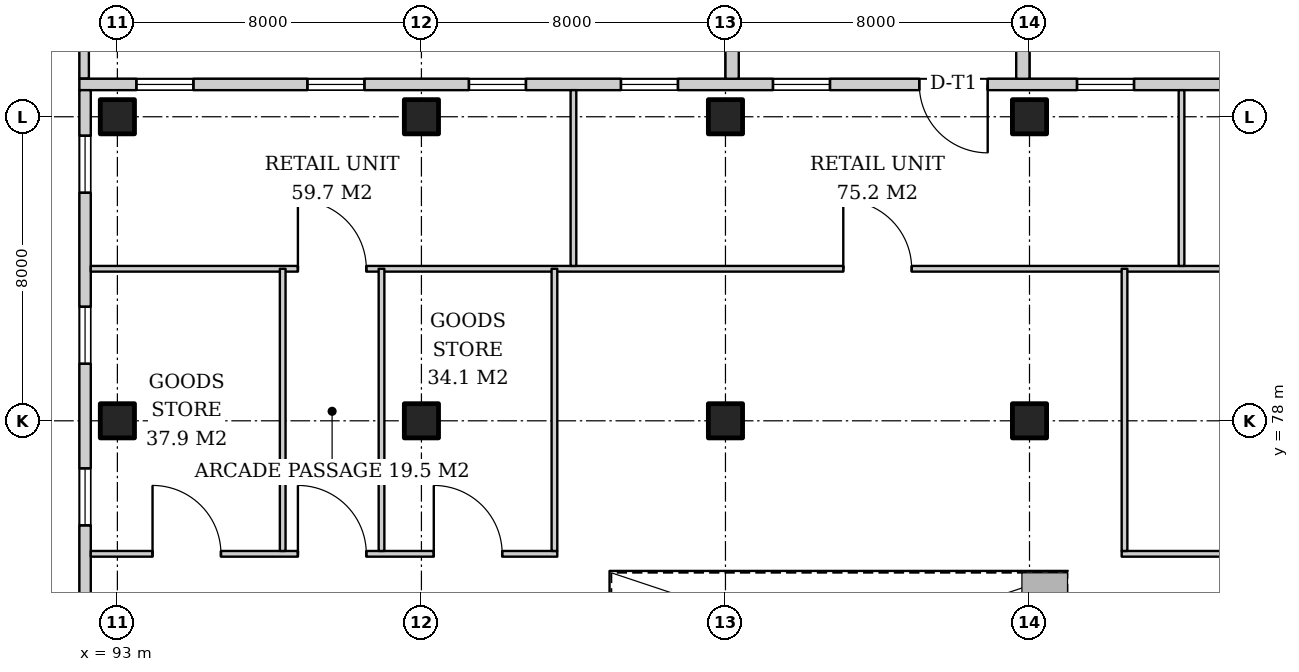
"""IFC4 building model, lengths in metres.
Left out: names, types, materials, properties, quantities, classifications, styles, units other than length and angle.
Written with IfcOpenShell. Run it as: python <this file> out.ifc"""

import sys

from ifc_helpers import new_model, si_unit, direction, frame, frame_2d, origin, origin_2d, place, context, subcontext, project, spatial, rectangle, extrude, element, fill, save


model = new_model("IFC4")
c1 = context("Model", 3, precision=1e-05, world=origin(), true_north=direction((0.0, 1.0)))
c2 = subcontext(c1, "Body", "Model", "MODEL_VIEW")
j1 = project(units=[si_unit("LENGTHUNIT", "METRE"), si_unit("PLANEANGLEUNIT", "RADIAN")], contexts=[c1])
p1 = place(None, origin())
s1 = spatial("IfcSite", under=j1, at=p1, CompositionType="ELEMENT")
p2 = place(p1, origin())
s2 = spatial("IfcBuilding", under=s1, at=p2, CompositionType="ELEMENT")
p3 = place(p2, frame((0.0, 0.0, 6.0)))
s3 = spatial("IfcBuildingStorey", under=s2, at=p3, CompositionType="ELEMENT", Elevation=6.0)
for number, where, z_axis, x_axis in (
    (1, (93.0, 78.0, 0.0), (0.0, 0.0, 1.0), (1.0, 0.0, 0.0)),
    (2, (93.0, 86.0, 0.0), (0.0, 0.0, 1.0), (1.0, 0.0, 0.0)),
    (3, (101.0, 78.0, 0.0), (0.0, 0.0, 1.0), (1.0, 0.0, 0.0)),
    (4, (101.0, 86.0, 0.0), (0.0, 0.0, 1.0), (1.0, 0.0, 0.0)),
    (5, (109.0, 78.0, 0.0), (0.0, 0.0, 1.0), (1.0, 0.0, 0.0)),
    (6, (109.0, 86.0, 0.0), (0.0, 0.0, 1.0), (1.0, 0.0, 0.0)),
    (7, (117.0, 78.0, 0.0), (0.0, 0.0, 1.0), (1.0, 0.0, 0.0)),
    (8, (117.0, 86.0, 0.0), (0.0, 0.0, 1.0), (1.0, 0.0, 0.0)),
):
    element("IfcColumn", number, at=place(p3, frame(where, z_axis=z_axis, x_axis=x_axis)), inside=s3, PredefinedType="COLUMN", context=c2, shape_type="SweptSolid", body=[
        extrude(rectangle(XDim=0.9, YDim=0.9, at=origin_2d()), origin(), (0.0, 0.0, 1.0), 5.0),
    ])
p4 = place(p3, frame((142.0, 86.85, 0.0), z_axis=(0.0, 0.0, 1.0), x_axis=(-1.0, 0.0, 0.0)))
e9 = element("IfcWall", 9, at=p4, inside=s3, PredefinedType="SOLIDWALL", context=c2, shape_type="SweptSolid", body=[
    extrude(rectangle(XDim=50.0, YDim=0.3, at=frame_2d((25.0, 0.0))), origin(), (0.0, 0.0, 1.0), 4.7),
])
p5 = place(p4, frame((1.5, 0.0, 0.9)))
e10 = element("IfcOpeningElement", 10, at=p5, cuts=e9, PredefinedType="OPENING", context=c2, shape_type="SweptSolid", body=[
    extrude(rectangle(XDim=1.5, YDim=3.2, at=frame_2d((0.75, 1.6))), frame((0.0, 0.16, 0.0), z_axis=(0.0, -1.0, 0.0), x_axis=(1.0, 0.0, 0.0)), (0.0, 0.0, 1.0), 0.32),
])
p6 = place(p4, frame((6.0, 0.0, 0.9)))
e11 = element("IfcOpeningElement", 11, at=p6, cuts=e9, PredefinedType="OPENING", context=c2, shape_type="SweptSolid", body=[
    extrude(rectangle(XDim=1.5, YDim=3.2, at=frame_2d((0.75, 1.6))), frame((0.0, 0.16, 0.0), z_axis=(0.0, -1.0, 0.0), x_axis=(1.0, 0.0, 0.0)), (0.0, 0.0, 1.0), 0.32),
])
p7 = place(p4, frame((10.25, 0.0, 0.9)))
e12 = element("IfcOpeningElement", 12, at=p7, cuts=e9, PredefinedType="OPENING", context=c2, shape_type="SweptSolid", body=[
    extrude(rectangle(XDim=1.5, YDim=3.2, at=frame_2d((0.75, 1.6))), frame((0.0, 0.16, 0.0), z_axis=(0.0, -1.0, 0.0), x_axis=(1.0, 0.0, 0.0)), (0.0, 0.0, 1.0), 0.32),
])
p8 = place(p4, frame((14.25, 0.0, 0.9)))
e13 = element("IfcOpeningElement", 13, at=p8, cuts=e9, PredefinedType="OPENING", context=c2, shape_type="SweptSolid", body=[
    extrude(rectangle(XDim=1.5, YDim=3.2, at=frame_2d((0.75, 1.6))), frame((0.0, 0.16, 0.0), z_axis=(0.0, -1.0, 0.0), x_axis=(1.0, 0.0, 0.0)), (0.0, 0.0, 1.0), 0.32),
])
p9 = place(p4, frame((18.25, 0.0, 0.9)))
e14 = element("IfcOpeningElement", 14, at=p9, cuts=e9, PredefinedType="OPENING", context=c2, shape_type="SweptSolid", body=[
    extrude(rectangle(XDim=1.5, YDim=3.2, at=frame_2d((0.75, 1.6))), frame((0.0, 0.16, 0.0), z_axis=(0.0, -1.0, 0.0), x_axis=(1.0, 0.0, 0.0)), (0.0, 0.0, 1.0), 0.32),
])
p10 = place(p4, frame((22.25, 0.0, 0.9)))
e15 = element("IfcOpeningElement", 15, at=p10, cuts=e9, PredefinedType="OPENING", context=c2, shape_type="SweptSolid", body=[
    extrude(rectangle(XDim=1.5, YDim=3.2, at=frame_2d((0.75, 1.6))), frame((0.0, 0.16, 0.0), z_axis=(0.0, -1.0, 0.0), x_axis=(1.0, 0.0, 0.0)), (0.0, 0.0, 1.0), 0.32),
])
p11 = place(p4, frame((26.1, 0.0, 0.0)))
e16 = element("IfcOpeningElement", 16, at=p11, cuts=e9, PredefinedType="OPENING", context=c2, shape_type="SweptSolid", body=[
    extrude(rectangle(XDim=1.8, YDim=2.4, at=frame_2d((0.9, 1.2))), frame((0.0, 0.16, 0.0), z_axis=(0.0, -1.0, 0.0), x_axis=(1.0, 0.0, 0.0)), (0.0, 0.0, 1.0), 0.32),
])
p12 = place(p4, frame((30.25, 0.0, 0.9)))
e17 = element("IfcOpeningElement", 17, at=p12, cuts=e9, PredefinedType="OPENING", context=c2, shape_type="SweptSolid", body=[
    extrude(rectangle(XDim=1.5, YDim=3.2, at=frame_2d((0.75, 1.6))), frame((0.0, 0.16, 0.0), z_axis=(0.0, -1.0, 0.0), x_axis=(1.0, 0.0, 0.0)), (0.0, 0.0, 1.0), 0.32),
])
p13 = place(p4, frame((34.25, 0.0, 0.9)))
e18 = element("IfcOpeningElement", 18, at=p13, cuts=e9, PredefinedType="OPENING", context=c2, shape_type="SweptSolid", body=[
    extrude(rectangle(XDim=1.5, YDim=3.2, at=frame_2d((0.75, 1.6))), frame((0.0, 0.16, 0.0), z_axis=(0.0, -1.0, 0.0), x_axis=(1.0, 0.0, 0.0)), (0.0, 0.0, 1.0), 0.32),
])
p14 = place(p4, frame((38.25, 0.0, 0.9)))
e19 = element("IfcOpeningElement", 19, at=p14, cuts=e9, PredefinedType="OPENING", context=c2, shape_type="SweptSolid", body=[
    extrude(rectangle(XDim=1.5, YDim=3.2, at=frame_2d((0.75, 1.6))), frame((0.0, 0.16, 0.0), z_axis=(0.0, -1.0, 0.0), x_axis=(1.0, 0.0, 0.0)), (0.0, 0.0, 1.0), 0.32),
])
p15 = place(p4, frame((42.5, 0.0, 0.9)))
e20 = element("IfcOpeningElement", 20, at=p15, cuts=e9, PredefinedType="OPENING", context=c2, shape_type="SweptSolid", body=[
    extrude(rectangle(XDim=1.5, YDim=3.2, at=frame_2d((0.75, 1.6))), frame((0.0, 0.16, 0.0), z_axis=(0.0, -1.0, 0.0), x_axis=(1.0, 0.0, 0.0)), (0.0, 0.0, 1.0), 0.32),
])
p16 = place(p4, frame((47.0, 0.0, 0.9)))
e21 = element("IfcOpeningElement", 21, at=p16, cuts=e9, PredefinedType="OPENING", context=c2, shape_type="SweptSolid", body=[
    extrude(rectangle(XDim=1.5, YDim=3.2, at=frame_2d((0.75, 1.6))), frame((0.0, 0.16, 0.0), z_axis=(0.0, -1.0, 0.0), x_axis=(1.0, 0.0, 0.0)), (0.0, 0.0, 1.0), 0.32),
])
p17 = place(p3, frame((92.15, 86.7, 0.0), z_axis=(0.0, 0.0, 1.0), x_axis=(0.0, -1.0, 0.0)))
e22 = element("IfcWall", 22, at=p17, inside=s3, PredefinedType="SOLIDWALL", context=c2, shape_type="SweptSolid", body=[
    extrude(rectangle(XDim=36.2, YDim=0.3, at=frame_2d((18.1, 0.0))), origin(), (0.0, 0.0, 1.0), 4.7),
])
p18 = place(p17, frame((1.2, 0.0, 0.9)))
e23 = element("IfcOpeningElement", 23, at=p18, cuts=e22, PredefinedType="OPENING", context=c2, shape_type="SweptSolid", body=[
    extrude(rectangle(XDim=1.5, YDim=3.2, at=frame_2d((0.75, 1.6))), frame((0.0, 0.16, 0.0), z_axis=(0.0, -1.0, 0.0), x_axis=(1.0, 0.0, 0.0)), (0.0, 0.0, 1.0), 0.32),
])
p19 = place(p17, frame((5.7, 0.0, 0.9)))
e24 = element("IfcOpeningElement", 24, at=p19, cuts=e22, PredefinedType="OPENING", context=c2, shape_type="SweptSolid", body=[
    extrude(rectangle(XDim=1.5, YDim=3.2, at=frame_2d((0.75, 1.6))), frame((0.0, 0.16, 0.0), z_axis=(0.0, -1.0, 0.0), x_axis=(1.0, 0.0, 0.0)), (0.0, 0.0, 1.0), 0.32),
])
p20 = place(p17, frame((9.95, 0.0, 0.9)))
e25 = element("IfcOpeningElement", 25, at=p20, cuts=e22, PredefinedType="OPENING", context=c2, shape_type="SweptSolid", body=[
    extrude(rectangle(XDim=1.5, YDim=3.2, at=frame_2d((0.75, 1.6))), frame((0.0, 0.16, 0.0), z_axis=(0.0, -1.0, 0.0), x_axis=(1.0, 0.0, 0.0)), (0.0, 0.0, 1.0), 0.32),
])
p21 = place(p17, frame((13.95, 0.0, 0.9)))
e26 = element("IfcOpeningElement", 26, at=p21, cuts=e22, PredefinedType="OPENING", context=c2, shape_type="SweptSolid", body=[
    extrude(rectangle(XDim=1.5, YDim=3.2, at=frame_2d((0.75, 1.6))), frame((0.0, 0.16, 0.0), z_axis=(0.0, -1.0, 0.0), x_axis=(1.0, 0.0, 0.0)), (0.0, 0.0, 1.0), 0.32),
])
p22 = place(p17, frame((17.95, 0.0, 0.9)))
e27 = element("IfcOpeningElement", 27, at=p22, cuts=e22, PredefinedType="OPENING", context=c2, shape_type="SweptSolid", body=[
    extrude(rectangle(XDim=1.5, YDim=3.2, at=frame_2d((0.75, 1.6))), frame((0.0, 0.16, 0.0), z_axis=(0.0, -1.0, 0.0), x_axis=(1.0, 0.0, 0.0)), (0.0, 0.0, 1.0), 0.32),
])
p23 = place(p17, frame((21.95, 0.0, 0.9)))
e28 = element("IfcOpeningElement", 28, at=p23, cuts=e22, PredefinedType="OPENING", context=c2, shape_type="SweptSolid", body=[
    extrude(rectangle(XDim=1.5, YDim=3.2, at=frame_2d((0.75, 1.6))), frame((0.0, 0.16, 0.0), z_axis=(0.0, -1.0, 0.0), x_axis=(1.0, 0.0, 0.0)), (0.0, 0.0, 1.0), 0.32),
])
p24 = place(p17, frame((25.95, 0.0, 0.9)))
e29 = element("IfcOpeningElement", 29, at=p24, cuts=e22, PredefinedType="OPENING", context=c2, shape_type="SweptSolid", body=[
    extrude(rectangle(XDim=1.5, YDim=3.2, at=frame_2d((0.75, 1.6))), frame((0.0, 0.16, 0.0), z_axis=(0.0, -1.0, 0.0), x_axis=(1.0, 0.0, 0.0)), (0.0, 0.0, 1.0), 0.32),
])
p25 = place(p17, frame((29.95, 0.0, 0.9)))
e30 = element("IfcOpeningElement", 30, at=p25, cuts=e22, PredefinedType="OPENING", context=c2, shape_type="SweptSolid", body=[
    extrude(rectangle(XDim=1.5, YDim=3.2, at=frame_2d((0.75, 1.6))), frame((0.0, 0.16, 0.0), z_axis=(0.0, -1.0, 0.0), x_axis=(1.0, 0.0, 0.0)), (0.0, 0.0, 1.0), 0.32),
])
p26 = place(p17, frame((33.95, 0.0, 0.9)))
e31 = element("IfcOpeningElement", 31, at=p26, cuts=e22, PredefinedType="OPENING", context=c2, shape_type="SweptSolid", body=[
    extrude(rectangle(XDim=1.5, YDim=3.2, at=frame_2d((0.75, 1.6))), frame((0.0, 0.16, 0.0), z_axis=(0.0, -1.0, 0.0), x_axis=(1.0, 0.0, 0.0)), (0.0, 0.0, 1.0), 0.32),
])
p27 = place(p3, frame((92.125, 87.01, 0.0), z_axis=(0.0, 0.0, 1.0), x_axis=(0.0, 1.0, 0.0)))
e32 = element("IfcWall", 32, at=p27, inside=s3, PredefinedType="PARAPET", context=c2, shape_type="SweptSolid", body=[
    extrude(rectangle(XDim=7.74, YDim=0.25, at=frame_2d((3.87, 0.0))), origin(), (0.0, 0.0, 1.0), 1.1),
])
for number, where, z_axis, x_axis in (
    (33, (109.175, 87.0, 0.0), (0.0, 0.0, 1.0), (0.0, 1.0, 0.0)),
    (34, (116.825, 87.0, 0.0), (0.0, 0.0, 1.0), (0.0, 1.0, 0.0)),
):
    element("IfcWall", number, at=place(p3, frame(where, z_axis=z_axis, x_axis=x_axis)), inside=s3, PredefinedType="PARAPET", context=c2, shape_type="SweptSolid", body=[
        extrude(rectangle(XDim=8.0, YDim=0.35, at=frame_2d((4.0, 0.0))), origin(), (0.0, 0.0, 1.0), 1.1),
    ])
p28 = place(p3, frame((92.3, 82.0, 0.0), z_axis=(0.0, 0.0, 1.0), x_axis=(1.0, 0.0, 0.0)))
e35 = element("IfcWall", 35, at=p28, inside=s3, PredefinedType="PARTITIONING", context=c2, shape_type="SweptSolid", body=[
    extrude(rectangle(XDim=49.4, YDim=0.15, at=frame_2d((24.7, 0.0))), origin(), (0.0, 0.0, 1.0), 3.2),
])
p29 = place(p28, frame((5.45, 0.0, 0.0)))
e36 = element("IfcOpeningElement", 36, at=p29, cuts=e35, PredefinedType="OPENING", context=c2, shape_type="SweptSolid", body=[
    extrude(rectangle(XDim=1.8, YDim=2.4, at=frame_2d((0.9, 1.2))), frame((0.0, 0.085, 0.0), z_axis=(0.0, -1.0, 0.0), x_axis=(1.0, 0.0, 0.0)), (0.0, 0.0, 1.0), 0.17),
])
p30 = place(p28, frame((19.8, 0.0, 0.0)))
e37 = element("IfcOpeningElement", 37, at=p30, cuts=e35, PredefinedType="OPENING", context=c2, shape_type="SweptSolid", body=[
    extrude(rectangle(XDim=1.8, YDim=2.4, at=frame_2d((0.9, 1.2))), frame((0.0, 0.085, 0.0), z_axis=(0.0, -1.0, 0.0), x_axis=(1.0, 0.0, 0.0)), (0.0, 0.0, 1.0), 0.17),
])
p31 = place(p28, frame((38.15, 0.0, 0.0)))
e38 = element("IfcOpeningElement", 38, at=p31, cuts=e35, PredefinedType="OPENING", context=c2, shape_type="SweptSolid", body=[
    extrude(rectangle(XDim=1.8, YDim=2.4, at=frame_2d((0.9, 1.2))), frame((0.0, 0.085, 0.0), z_axis=(0.0, -1.0, 0.0), x_axis=(1.0, 0.0, 0.0)), (0.0, 0.0, 1.0), 0.17),
])
for number, where, z_axis, x_axis in (
    (39, (105.0, 82.075, 0.0), (0.0, 0.0, 1.0), (0.0, 1.0, 0.0)),
    (40, (121.0, 82.075, 0.0), (0.0, 0.0, 1.0), (0.0, 1.0, 0.0)),
):
    element("IfcWall", number, at=place(p3, frame(where, z_axis=z_axis, x_axis=x_axis)), inside=s3, PredefinedType="PARTITIONING", context=c2, shape_type="SweptSolid", body=[
        extrude(rectangle(XDim=4.625, YDim=0.15, at=frame_2d((2.312, 0.0))), origin(), (0.0, 0.0, 1.0), 3.2),
    ])
p32 = place(p3, frame((92.3, 74.5, 0.0), z_axis=(0.0, 0.0, 1.0), x_axis=(1.0, 0.0, 0.0)))
e41 = element("IfcWall", 41, at=p32, inside=s3, PredefinedType="PARTITIONING", context=c2, shape_type="SweptSolid", body=[
    extrude(rectangle(XDim=12.275, YDim=0.15, at=frame_2d((6.137, 0.0))), origin(), (0.0, 0.0, 1.0), 4.7),
])
p33 = place(p32, frame((1.625, 0.0, 0.0)))
e42 = element("IfcOpeningElement", 42, at=p33, cuts=e41, PredefinedType="OPENING", context=c2, shape_type="SweptSolid", body=[
    extrude(rectangle(XDim=1.8, YDim=2.4, at=frame_2d((0.9, 1.2))), frame((0.0, 0.085, 0.0), z_axis=(0.0, -1.0, 0.0), x_axis=(1.0, 0.0, 0.0)), (0.0, 0.0, 1.0), 0.17),
])
p34 = place(p32, frame((5.45, 0.0, 0.0)))
e43 = element("IfcOpeningElement", 43, at=p34, cuts=e41, PredefinedType="OPENING", context=c2, shape_type="SweptSolid", body=[
    extrude(rectangle(XDim=1.8, YDim=2.4, at=frame_2d((0.9, 1.2))), frame((0.0, 0.085, 0.0), z_axis=(0.0, -1.0, 0.0), x_axis=(1.0, 0.0, 0.0)), (0.0, 0.0, 1.0), 0.17),
])
p35 = place(p32, frame((9.025, 0.0, 0.0)))
e44 = element("IfcOpeningElement", 44, at=p35, cuts=e41, PredefinedType="OPENING", context=c2, shape_type="SweptSolid", body=[
    extrude(rectangle(XDim=1.8, YDim=2.4, at=frame_2d((0.9, 1.2))), frame((0.0, 0.085, 0.0), z_axis=(0.0, -1.0, 0.0), x_axis=(1.0, 0.0, 0.0)), (0.0, 0.0, 1.0), 0.17),
])
for number, where, z_axis, x_axis in (
    (45, (104.5, 74.575, 0.0), (0.0, 0.0, 1.0), (0.0, 1.0, 0.0)),
    (46, (97.35, 74.575, 0.0), (0.0, 0.0, 1.0), (0.0, 1.0, 0.0)),
    (47, (99.95, 74.575, 0.0), (0.0, 0.0, 1.0), (0.0, 1.0, 0.0)),
):
    element("IfcWall", number, at=place(p3, frame(where, z_axis=z_axis, x_axis=x_axis)), inside=s3, PredefinedType="PARTITIONING", context=c2, shape_type="SweptSolid", body=[
        extrude(rectangle(XDim=7.425, YDim=0.15, at=frame_2d((3.712, 0.0))), origin(), (0.0, 0.0, 1.0), 4.7),
    ])
p36 = place(p3, frame((119.425, 74.5, 0.0), z_axis=(0.0, 0.0, 1.0), x_axis=(1.0, 0.0, 0.0)))
e48 = element("IfcWall", 48, at=p36, inside=s3, PredefinedType="PARTITIONING", context=c2, shape_type="SweptSolid", body=[
    extrude(rectangle(XDim=22.275, YDim=0.15, at=frame_2d((11.137, 0.0))), origin(), (0.0, 0.0, 1.0), 4.7),
])
p37 = place(p36, frame((4.45, 0.0, 0.0)))
e49 = element("IfcOpeningElement", 49, at=p37, cuts=e48, PredefinedType="OPENING", context=c2, shape_type="SweptSolid", body=[
    extrude(rectangle(XDim=1.8, YDim=2.4, at=frame_2d((0.9, 1.2))), frame((0.0, 0.085, 0.0), z_axis=(0.0, -1.0, 0.0), x_axis=(1.0, 0.0, 0.0)), (0.0, 0.0, 1.0), 0.17),
])
p38 = place(p36, frame((11.025, 0.0, 0.0)))
e50 = element("IfcOpeningElement", 50, at=p38, cuts=e48, PredefinedType="OPENING", context=c2, shape_type="SweptSolid", body=[
    extrude(rectangle(XDim=1.8, YDim=2.4, at=frame_2d((0.9, 1.2))), frame((0.0, 0.085, 0.0), z_axis=(0.0, -1.0, 0.0), x_axis=(1.0, 0.0, 0.0)), (0.0, 0.0, 1.0), 0.17),
])
p39 = place(p36, frame((16.85, 0.0, 0.0)))
e51 = element("IfcOpeningElement", 51, at=p39, cuts=e48, PredefinedType="OPENING", context=c2, shape_type="SweptSolid", body=[
    extrude(rectangle(XDim=1.8, YDim=2.4, at=frame_2d((0.9, 1.2))), frame((0.0, 0.085, 0.0), z_axis=(0.0, -1.0, 0.0), x_axis=(1.0, 0.0, 0.0)), (0.0, 0.0, 1.0), 0.17),
])
p40 = place(p3, frame((119.5, 74.575, 0.0), z_axis=(0.0, 0.0, 1.0), x_axis=(0.0, 1.0, 0.0)))
e52 = element("IfcWall", 52, at=p40, inside=s3, PredefinedType="PARTITIONING", context=c2, shape_type="SweptSolid", body=[
    extrude(rectangle(XDim=7.425, YDim=0.15, at=frame_2d((3.712, 0.0))), origin(), (0.0, 0.0, 1.0), 4.7),
])
p41 = place(p10, origin())
e53 = element("IfcWindow", 53, at=p41, inside=s3, PartitioningType="SINGLE_PANEL", PredefinedType="WINDOW", context=c2, shape_type="SweptSolid", body=[
    extrude(rectangle(XDim=1.5, YDim=3.2, at=frame_2d((0.75, 1.6))), frame((0.0, 0.03, 0.0), z_axis=(0.0, -1.0, 0.0), x_axis=(1.0, 0.0, 0.0)), (0.0, 0.0, 1.0), 0.06),
])
fill(e15, e53)
p42 = place(p11, origin())
e54 = element("IfcDoor", 54, at=p42, inside=s3, OperationType="DOUBLE_DOOR_SINGLE_SWING", PredefinedType="DOOR", context=c2, shape_type="SweptSolid", body=[
    extrude(rectangle(XDim=1.8, YDim=2.4, at=frame_2d((0.9, 1.2))), frame((0.0, 0.025, 0.0), z_axis=(0.0, -1.0, 0.0), x_axis=(1.0, 0.0, 0.0)), (0.0, 0.0, 1.0), 0.05),
])
fill(e16, e54)
p43 = place(p12, origin())
e55 = element("IfcWindow", 55, at=p43, inside=s3, PartitioningType="SINGLE_PANEL", PredefinedType="WINDOW", context=c2, shape_type="SweptSolid", body=[
    extrude(rectangle(XDim=1.5, YDim=3.2, at=frame_2d((0.75, 1.6))), frame((0.0, 0.03, 0.0), z_axis=(0.0, -1.0, 0.0), x_axis=(1.0, 0.0, 0.0)), (0.0, 0.0, 1.0), 0.06),
])
fill(e17, e55)
p44 = place(p13, origin())
e56 = element("IfcWindow", 56, at=p44, inside=s3, PartitioningType="SINGLE_PANEL", PredefinedType="WINDOW", context=c2, shape_type="SweptSolid", body=[
    extrude(rectangle(XDim=1.5, YDim=3.2, at=frame_2d((0.75, 1.6))), frame((0.0, 0.03, 0.0), z_axis=(0.0, -1.0, 0.0), x_axis=(1.0, 0.0, 0.0)), (0.0, 0.0, 1.0), 0.06),
])
fill(e18, e56)
p45 = place(p14, origin())
e57 = element("IfcWindow", 57, at=p45, inside=s3, PartitioningType="SINGLE_PANEL", PredefinedType="WINDOW", context=c2, shape_type="SweptSolid", body=[
    extrude(rectangle(XDim=1.5, YDim=3.2, at=frame_2d((0.75, 1.6))), frame((0.0, 0.03, 0.0), z_axis=(0.0, -1.0, 0.0), x_axis=(1.0, 0.0, 0.0)), (0.0, 0.0, 1.0), 0.06),
])
fill(e19, e57)
p46 = place(p15, origin())
e58 = element("IfcWindow", 58, at=p46, inside=s3, PartitioningType="SINGLE_PANEL", PredefinedType="WINDOW", context=c2, shape_type="SweptSolid", body=[
    extrude(rectangle(XDim=1.5, YDim=3.2, at=frame_2d((0.75, 1.6))), frame((0.0, 0.03, 0.0), z_axis=(0.0, -1.0, 0.0), x_axis=(1.0, 0.0, 0.0)), (0.0, 0.0, 1.0), 0.06),
])
fill(e20, e58)
p47 = place(p16, origin())
e59 = element("IfcWindow", 59, at=p47, inside=s3, PartitioningType="SINGLE_PANEL", PredefinedType="WINDOW", context=c2, shape_type="SweptSolid", body=[
    extrude(rectangle(XDim=1.5, YDim=3.2, at=frame_2d((0.75, 1.6))), frame((0.0, 0.03, 0.0), z_axis=(0.0, -1.0, 0.0), x_axis=(1.0, 0.0, 0.0)), (0.0, 0.0, 1.0), 0.06),
])
fill(e21, e59)
p48 = place(p18, origin())
e60 = element("IfcWindow", 60, at=p48, inside=s3, PartitioningType="SINGLE_PANEL", PredefinedType="WINDOW", context=c2, shape_type="SweptSolid", body=[
    extrude(rectangle(XDim=1.5, YDim=3.2, at=frame_2d((0.75, 1.6))), frame((0.0, 0.03, 0.0), z_axis=(0.0, -1.0, 0.0), x_axis=(1.0, 0.0, 0.0)), (0.0, 0.0, 1.0), 0.06),
])
fill(e23, e60)
p49 = place(p19, origin())
e61 = element("IfcWindow", 61, at=p49, inside=s3, PartitioningType="SINGLE_PANEL", PredefinedType="WINDOW", context=c2, shape_type="SweptSolid", body=[
    extrude(rectangle(XDim=1.5, YDim=3.2, at=frame_2d((0.75, 1.6))), frame((0.0, 0.03, 0.0), z_axis=(0.0, -1.0, 0.0), x_axis=(1.0, 0.0, 0.0)), (0.0, 0.0, 1.0), 0.06),
])
fill(e24, e61)
p50 = place(p20, origin())
e62 = element("IfcWindow", 62, at=p50, inside=s3, PartitioningType="SINGLE_PANEL", PredefinedType="WINDOW", context=c2, shape_type="SweptSolid", body=[
    extrude(rectangle(XDim=1.5, YDim=3.2, at=frame_2d((0.75, 1.6))), frame((0.0, 0.03, 0.0), z_axis=(0.0, -1.0, 0.0), x_axis=(1.0, 0.0, 0.0)), (0.0, 0.0, 1.0), 0.06),
])
fill(e25, e62)
p51 = place(p29, origin())
e63 = element("IfcDoor", 63, at=p51, inside=s3, OperationType="DOUBLE_DOOR_SINGLE_SWING", PredefinedType="DOOR", context=c2, shape_type="SweptSolid", body=[
    extrude(rectangle(XDim=1.8, YDim=2.4, at=frame_2d((0.9, 1.2))), frame((0.0, 0.025, 0.0), z_axis=(0.0, -1.0, 0.0), x_axis=(1.0, 0.0, 0.0)), (0.0, 0.0, 1.0), 0.05),
])
fill(e36, e63)
p52 = place(p30, origin())
e64 = element("IfcDoor", 64, at=p52, inside=s3, OperationType="DOUBLE_DOOR_SINGLE_SWING", PredefinedType="DOOR", context=c2, shape_type="SweptSolid", body=[
    extrude(rectangle(XDim=1.8, YDim=2.4, at=frame_2d((0.9, 1.2))), frame((0.0, 0.025, 0.0), z_axis=(0.0, -1.0, 0.0), x_axis=(1.0, 0.0, 0.0)), (0.0, 0.0, 1.0), 0.05),
])
fill(e37, e64)
p53 = place(p33, origin())
e65 = element("IfcDoor", 65, at=p53, inside=s3, OperationType="DOUBLE_DOOR_SINGLE_SWING", PredefinedType="DOOR", context=c2, shape_type="SweptSolid", body=[
    extrude(rectangle(XDim=1.8, YDim=2.4, at=frame_2d((0.9, 1.2))), frame((0.0, 0.025, 0.0), z_axis=(0.0, -1.0, 0.0), x_axis=(1.0, 0.0, 0.0)), (0.0, 0.0, 1.0), 0.05),
])
fill(e42, e65)
p54 = place(p34, origin())
e66 = element("IfcDoor", 66, at=p54, inside=s3, OperationType="DOUBLE_DOOR_SINGLE_SWING", PredefinedType="DOOR", context=c2, shape_type="SweptSolid", body=[
    extrude(rectangle(XDim=1.8, YDim=2.4, at=frame_2d((0.9, 1.2))), frame((0.0, 0.025, 0.0), z_axis=(0.0, -1.0, 0.0), x_axis=(1.0, 0.0, 0.0)), (0.0, 0.0, 1.0), 0.05),
])
fill(e43, e66)
p55 = place(p35, origin())
e67 = element("IfcDoor", 67, at=p55, inside=s3, OperationType="DOUBLE_DOOR_SINGLE_SWING", PredefinedType="DOOR", context=c2, shape_type="SweptSolid", body=[
    extrude(rectangle(XDim=1.8, YDim=2.4, at=frame_2d((0.9, 1.2))), frame((0.0, 0.025, 0.0), z_axis=(0.0, -1.0, 0.0), x_axis=(1.0, 0.0, 0.0)), (0.0, 0.0, 1.0), 0.05),
])
fill(e44, e67)
save(model, sys.argv[1])
